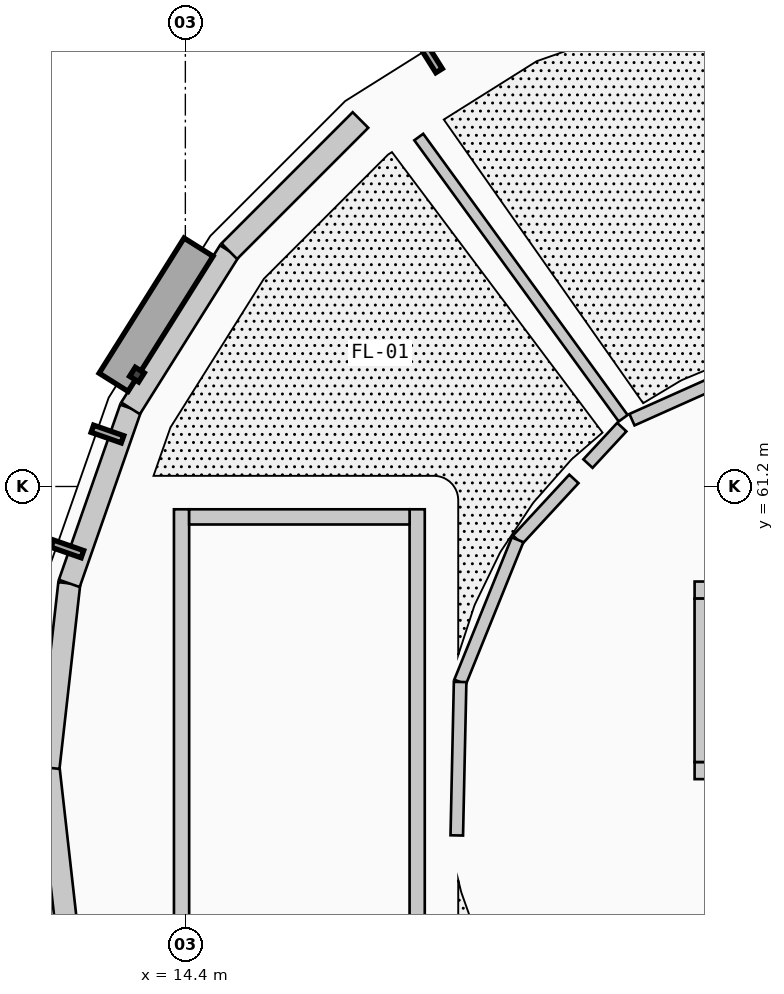
"""IFC4 building model, lengths in metres.
Left out: names, types, materials, properties, quantities, classifications, styles, units other than length and angle.
Written with IfcOpenShell. Run it as: python <this file> out.ifc"""

import sys

from ifc_helpers import new_model, si_unit, direction, frame, frame_2d, origin, origin_2d, place, context, subcontext, project, spatial, rectangle, extrude, element, fill, save


model = new_model("IFC4")
c1 = context("Model", 3, precision=1e-05, world=origin(), true_north=direction((0.0, 1.0)))
c2 = subcontext(c1, "Body", "Model", "MODEL_VIEW")
j1 = project(units=[si_unit("LENGTHUNIT", "METRE"), si_unit("PLANEANGLEUNIT", "RADIAN")], contexts=[c1])
p1 = place(None, origin())
s1 = spatial("IfcSite", under=j1, at=p1, CompositionType="ELEMENT")
p2 = place(p1, origin())
s2 = spatial("IfcBuilding", under=s1, at=p2, CompositionType="ELEMENT")
p3 = place(p2, frame((0.0, 0.0, 4.55)))
s3 = spatial("IfcBuildingStorey", under=s2, at=p3, CompositionType="ELEMENT", Elevation=4.55)
for number, where, z_axis, x_axis in (
    (1, (17.028, 65.615, 0.0), (0.0, 0.0, 1.0), (1.0, 0.0, 0.0)),
    (2, (14.148, 62.004, 0.0), (0.0, 0.0, 1.0), (1.0, 0.0, 0.0)),
    (3, (13.12, 57.5, 0.0), (0.0, 0.0, 1.0), (1.0, 0.0, 0.0)),
    (4, (19.54, 61.46, 0.0), (0.0, 0.0, 1.0), (1.0, 0.0, 0.0)),
):
    element("IfcColumn", number, at=place(p3, frame(where, z_axis=z_axis, x_axis=x_axis)), inside=s3, PredefinedType="COLUMN", context=c2, shape_type="SweptSolid", body=[
        extrude(rectangle(XDim=0.315, YDim=0.315, at=origin_2d()), origin(), (0.0, 0.0, 1.0), 4.2),
    ])
for number, where, z_axis, x_axis in (
    (5, (12.873, 55.075, 0.0), (0.0, 0.0, 1.0), (-0.112, 0.994, 0.0)),
    (6, (12.6, 57.5, 0.0), (0.0, 0.0, 1.0), (0.112, 0.994, 0.0)),
):
    element("IfcWall", number, at=place(p3, frame(where, z_axis=z_axis, x_axis=x_axis)), inside=s3, PredefinedType="ELEMENTEDWALL", context=c2, shape_type="SweptSolid", body=[
        extrude(rectangle(XDim=2.44, YDim=0.29, at=frame_2d((1.22, 0.0))), origin(), (0.0, 0.0, 1.0), 3.314),
    ])
p4 = place(p3, frame((12.873, 59.925, 0.0), z_axis=(0.0, 0.0, 1.0), x_axis=(0.330176659411, 0.943919156274, 0.0)))
e7 = element("IfcWall", 7, at=p4, inside=s3, PredefinedType="ELEMENTEDWALL", context=c2, shape_type="SweptSolid", body=[
    extrude(rectangle(XDim=2.441, YDim=0.29, at=frame_2d((1.22, 0.0))), origin(), (0.0, 0.0, 1.0), 3.314),
])
p5 = place(p4, frame((0.67, 0.0, 0.85)))
e8 = element("IfcOpeningElement", 8, at=p5, cuts=e7, PredefinedType="OPENING", context=c2, shape_type="SweptSolid", body=[
    extrude(rectangle(XDim=1.1, YDim=1.85, at=frame_2d((0.55, 0.925))), frame((0.0, 0.155, 0.0), z_axis=(0.0, -1.0, 0.0), x_axis=(1.0, 0.0, 0.0)), (0.0, 0.0, 1.0), 0.31),
])
p6 = place(p3, frame((13.679, 62.229, 0.0), z_axis=(0.0, 0.0, 1.0), x_axis=(0.532136726684, 0.846658434148, 0.0)))
e9 = element("IfcWall", 9, at=p6, inside=s3, PredefinedType="ELEMENTEDWALL", context=c2, shape_type="SweptSolid", body=[
    extrude(rectangle(XDim=2.441, YDim=0.29, at=frame_2d((1.221, 0.0))), origin(), (0.0, 0.0, 1.0), 3.314),
])
p7 = place(p6, frame((0.671, 0.0, 0.85)))
e10 = element("IfcOpeningElement", 10, at=p7, cuts=e9, PredefinedType="OPENING", context=c2, shape_type="SweptSolid", body=[
    extrude(rectangle(XDim=1.1, YDim=2.1, at=frame_2d((0.55, 1.05))), frame((0.0, 0.155, 0.0), z_axis=(0.0, -1.0, 0.0), x_axis=(1.0, 0.0, 0.0)), (0.0, 0.0, 1.0), 0.31),
])
p8 = place(p3, frame((14.978, 64.296, 0.0), z_axis=(0.0, 0.0, 1.0), x_axis=(0.707106781187, 0.707106781187, 0.0)))
e11 = element("IfcWall", 11, at=p8, inside=s3, PredefinedType="ELEMENTEDWALL", context=c2, shape_type="SweptSolid", body=[
    extrude(rectangle(XDim=2.441, YDim=0.29, at=frame_2d((1.22, 0.0))), origin(), (0.0, 0.0, 1.0), 3.314),
])
p9 = place(p8, frame((0.66, 0.0, 0.85)))
e12 = element("IfcOpeningElement", 12, at=p9, cuts=e11, PredefinedType="OPENING", context=c2, shape_type="SweptSolid", body=[
    extrude(rectangle(XDim=1.12, YDim=1.65, at=frame_2d((0.56, 0.825))), frame((0.0, 0.155, 0.0), z_axis=(0.0, -1.0, 0.0), x_axis=(1.0, 0.0, 0.0)), (0.0, 0.0, 1.0), 0.31),
])
p10 = place(p3, frame((17.45, 54.1, 0.0), z_axis=(0.0, 0.0, 1.0), x_axis=(0.0, 1.0, 0.0)))
e13 = element("IfcWall", 13, at=p10, inside=s3, PredefinedType="SHEAR", context=c2, shape_type="SweptSolid", body=[
    extrude(rectangle(XDim=6.8, YDim=0.2, at=frame_2d((3.4, 0.0))), origin(), (0.0, 0.0, 1.0), 3.96),
])
p11 = place(p10, frame((0.38, 0.0, 0.0)))
e14 = element("IfcOpeningElement", 14, at=p11, cuts=e13, PredefinedType="OPENING", context=c2, shape_type="SweptSolid", body=[
    extrude(rectangle(XDim=1.1, YDim=2.15, at=frame_2d((0.55, 1.075))), frame((0.0, 0.11, 0.0), z_axis=(0.0, -1.0, 0.0), x_axis=(1.0, 0.0, 0.0)), (0.0, 0.0, 1.0), 0.22),
])
p12 = place(p3, frame((14.35, 54.1, 0.0), z_axis=(0.0, 0.0, 1.0), x_axis=(0.0, 1.0, 0.0)))
e15 = element("IfcWall", 15, at=p12, inside=s3, PredefinedType="SHEAR", context=c2, shape_type="SweptSolid", body=[
    extrude(rectangle(XDim=6.8, YDim=0.2, at=frame_2d((3.4, 0.0))), origin(), (0.0, 0.0, 1.0), 3.96),
])
p13 = place(p3, frame((17.35, 60.8, 0.0), z_axis=(0.0, 0.0, 1.0), x_axis=(-1.0, 0.0, 0.0)))
e16 = element("IfcWall", 16, at=p13, inside=s3, PredefinedType="SHEAR", context=c2, shape_type="SweptSolid", body=[
    extrude(rectangle(XDim=2.9, YDim=0.2, at=frame_2d((1.45, 0.0))), origin(), (0.0, 0.0, 1.0), 3.96),
])
p14 = place(p3, frame((21.1, 57.462, 0.0), z_axis=(0.0, 0.0, 1.0), x_axis=(1.0, 0.0, 0.0)))
e17 = element("IfcWall", 17, at=p14, inside=s3, PredefinedType="SHEAR", context=c2, shape_type="SweptSolid", body=[
    extrude(rectangle(XDim=3.1, YDim=0.225, at=frame_2d((1.55, 0.0))), origin(), (0.0, 0.0, 1.0), 3.96),
])
p15 = place(p14, frame((0.95, 0.0, 0.0)))
e18 = element("IfcOpeningElement", 18, at=p15, cuts=e17, PredefinedType="OPENING", context=c2, shape_type="SweptSolid", body=[
    extrude(rectangle(XDim=1.2, YDim=2.2, at=frame_2d((0.6, 1.1))), frame((0.0, 0.123, 0.0), z_axis=(0.0, -1.0, 0.0), x_axis=(1.0, 0.0, 0.0)), (0.0, 0.0, 1.0), 0.245),
])
p16 = place(p3, frame((21.1, 59.837, 0.0), z_axis=(0.0, 0.0, 1.0), x_axis=(1.0, 0.0, 0.0)))
e19 = element("IfcWall", 19, at=p16, inside=s3, PredefinedType="SHEAR", context=c2, shape_type="SweptSolid", body=[
    extrude(rectangle(XDim=3.1, YDim=0.225, at=frame_2d((1.55, 0.0))), origin(), (0.0, 0.0, 1.0), 3.96),
])
p17 = place(p3, frame((21.212, 57.575, 0.0), z_axis=(0.0, 0.0, 1.0), x_axis=(0.0, 1.0, 0.0)))
e20 = element("IfcWall", 20, at=p17, inside=s3, PredefinedType="SHEAR", context=c2, shape_type="SweptSolid", body=[
    extrude(rectangle(XDim=2.15, YDim=0.225, at=frame_2d((1.075, 0.0))), origin(), (0.0, 0.0, 1.0), 3.96),
])
p18 = place(p3, frame((20.16, 62.098, 0.0), z_axis=(0.0, 0.0, 1.0), x_axis=(-0.587873334136, 0.808952991843, 0.0)))
e21 = element("IfcWall", 21, at=p18, inside=s3, PredefinedType="PARTITIONING", context=c2, shape_type="SweptSolid", body=[
    extrude(rectangle(XDim=4.574, YDim=0.145, at=frame_2d((2.287, 0.0))), origin(), (0.0, 0.0, 1.0), 3.279),
])
p19 = place(p3, frame((22.236, 62.955, 0.0), z_axis=(0.0, 0.0, 1.0), x_axis=(-0.912984379162, -0.407994513941, 0.0)))
e22 = element("IfcWall", 22, at=p19, inside=s3, PredefinedType="PARTITIONING", context=c2, shape_type="SweptSolid", body=[
    extrude(rectangle(XDim=2.147, YDim=0.165, at=frame_2d((1.073, 0.0))), origin(), (0.0, 0.0, 1.0), 3.279),
])
p20 = place(p3, frame((20.142, 61.981, 0.0), z_axis=(0.0, 0.0, 1.0), x_axis=(-0.679935917373, -0.73327153788, 0.0)))
e23 = element("IfcWall", 23, at=p20, inside=s3, PredefinedType="PARTITIONING", context=c2, shape_type="SweptSolid", body=[
    extrude(rectangle(XDim=0.655, YDim=0.165, at=frame_2d((0.327, 0.0))), origin(), (0.0, 0.0, 1.0), 3.279),
])
p21 = place(p3, frame((19.512, 61.3, 0.0), z_axis=(0.0, 0.0, 1.0), x_axis=(-0.679051024612, -0.734091074713, 0.0)))
e24 = element("IfcWall", 24, at=p21, inside=s3, PredefinedType="PARTITIONING", context=c2, shape_type="SweptSolid", body=[
    extrude(rectangle(XDim=1.091, YDim=0.165, at=frame_2d((0.545, 0.0))), origin(), (0.0, 0.0, 1.0), 3.279),
])
p22 = place(p3, frame((18.771, 60.499, 0.0), z_axis=(0.0, 0.0, 1.0), x_axis=(-0.374663065009, -0.927161036562, 0.0)))
e25 = element("IfcWall", 25, at=p22, inside=s3, PredefinedType="PARTITIONING", context=c2, shape_type="SweptSolid", body=[
    extrude(rectangle(XDim=2.018, YDim=0.165, at=frame_2d((1.009, 0.0))), origin(), (0.0, 0.0, 1.0), 3.279),
])
p23 = place(p22, frame((0.449, 0.0, 0.0)))
e26 = element("IfcOpeningElement", 26, at=p23, cuts=e25, PredefinedType="OPENING", context=c2, shape_type="SweptSolid", body=[
    extrude(rectangle(XDim=1.12, YDim=2.16, at=frame_2d((0.56, 1.08))), frame((0.0, 0.093, 0.0), z_axis=(0.0, -1.0, 0.0), x_axis=(1.0, 0.0, 0.0)), (0.0, 0.0, 1.0), 0.185),
])
p24 = place(p3, frame((18.015, 58.628, 0.0), z_axis=(0.0, 0.0, 1.0), x_axis=(-0.021760263499, -0.999763217433, 0.0)))
e27 = element("IfcWall", 27, at=p24, inside=s3, PredefinedType="PARTITIONING", context=c2, shape_type="SweptSolid", body=[
    extrude(rectangle(XDim=2.02, YDim=0.165, at=frame_2d((1.01, 0.0))), origin(), (0.0, 0.0, 1.0), 3.279),
])
p25 = place(p5, origin())
e28 = element("IfcWindow", 28, at=p25, inside=s3, PartitioningType="SINGLE_PANEL", PredefinedType="WINDOW", context=c2, shape_type="SweptSolid", body=[
    extrude(rectangle(XDim=1.1, YDim=1.85, at=frame_2d((0.55, 0.925))), frame((0.0, 0.03, 0.0), z_axis=(0.0, -1.0, 0.0), x_axis=(1.0, 0.0, 0.0)), (0.0, 0.0, 1.0), 0.06),
])
fill(e8, e28)
p26 = place(p7, origin())
e29 = element("IfcWindow", 29, at=p26, inside=s3, PartitioningType="SINGLE_PANEL", PredefinedType="WINDOW", context=c2, shape_type="SweptSolid", body=[
    extrude(rectangle(XDim=1.1, YDim=2.1, at=frame_2d((0.55, 1.05))), frame((0.0, 0.03, 0.0), z_axis=(0.0, -1.0, 0.0), x_axis=(1.0, 0.0, 0.0)), (0.0, 0.0, 1.0), 0.06),
])
fill(e10, e29)
p27 = place(p9, origin())
e30 = element("IfcWindow", 30, at=p27, inside=s3, PartitioningType="SINGLE_PANEL", PredefinedType="WINDOW", context=c2, shape_type="SweptSolid", body=[
    extrude(rectangle(XDim=1.12, YDim=1.65, at=frame_2d((0.56, 0.825))), frame((0.0, 0.03, 0.0), z_axis=(0.0, -1.0, 0.0), x_axis=(1.0, 0.0, 0.0)), (0.0, 0.0, 1.0), 0.06),
])
fill(e12, e30)
p28 = place(p11, origin())
e31 = element("IfcDoor", 31, at=p28, inside=s3, OperationType="SINGLE_SWING_RIGHT", PredefinedType="DOOR", context=c2, shape_type="SweptSolid", body=[
    extrude(rectangle(XDim=1.1, YDim=2.15, at=frame_2d((0.55, 1.075))), frame((0.0, 0.025, 0.0), z_axis=(0.0, -1.0, 0.0), x_axis=(1.0, 0.0, 0.0)), (0.0, 0.0, 1.0), 0.05),
])
fill(e14, e31)
p29 = place(p23, origin())
e32 = element("IfcDoor", 32, at=p29, inside=s3, OperationType="SINGLE_SWING_LEFT", PredefinedType="DOOR", context=c2, shape_type="SweptSolid", body=[
    extrude(rectangle(XDim=1.12, YDim=2.16, at=frame_2d((0.56, 1.08))), frame((0.0, 0.025, 0.0), z_axis=(0.0, -1.0, 0.0), x_axis=(1.0, 0.0, 0.0)), (0.0, 0.0, 1.0), 0.05),
])
fill(e26, e32)
save(model, sys.argv[1])
